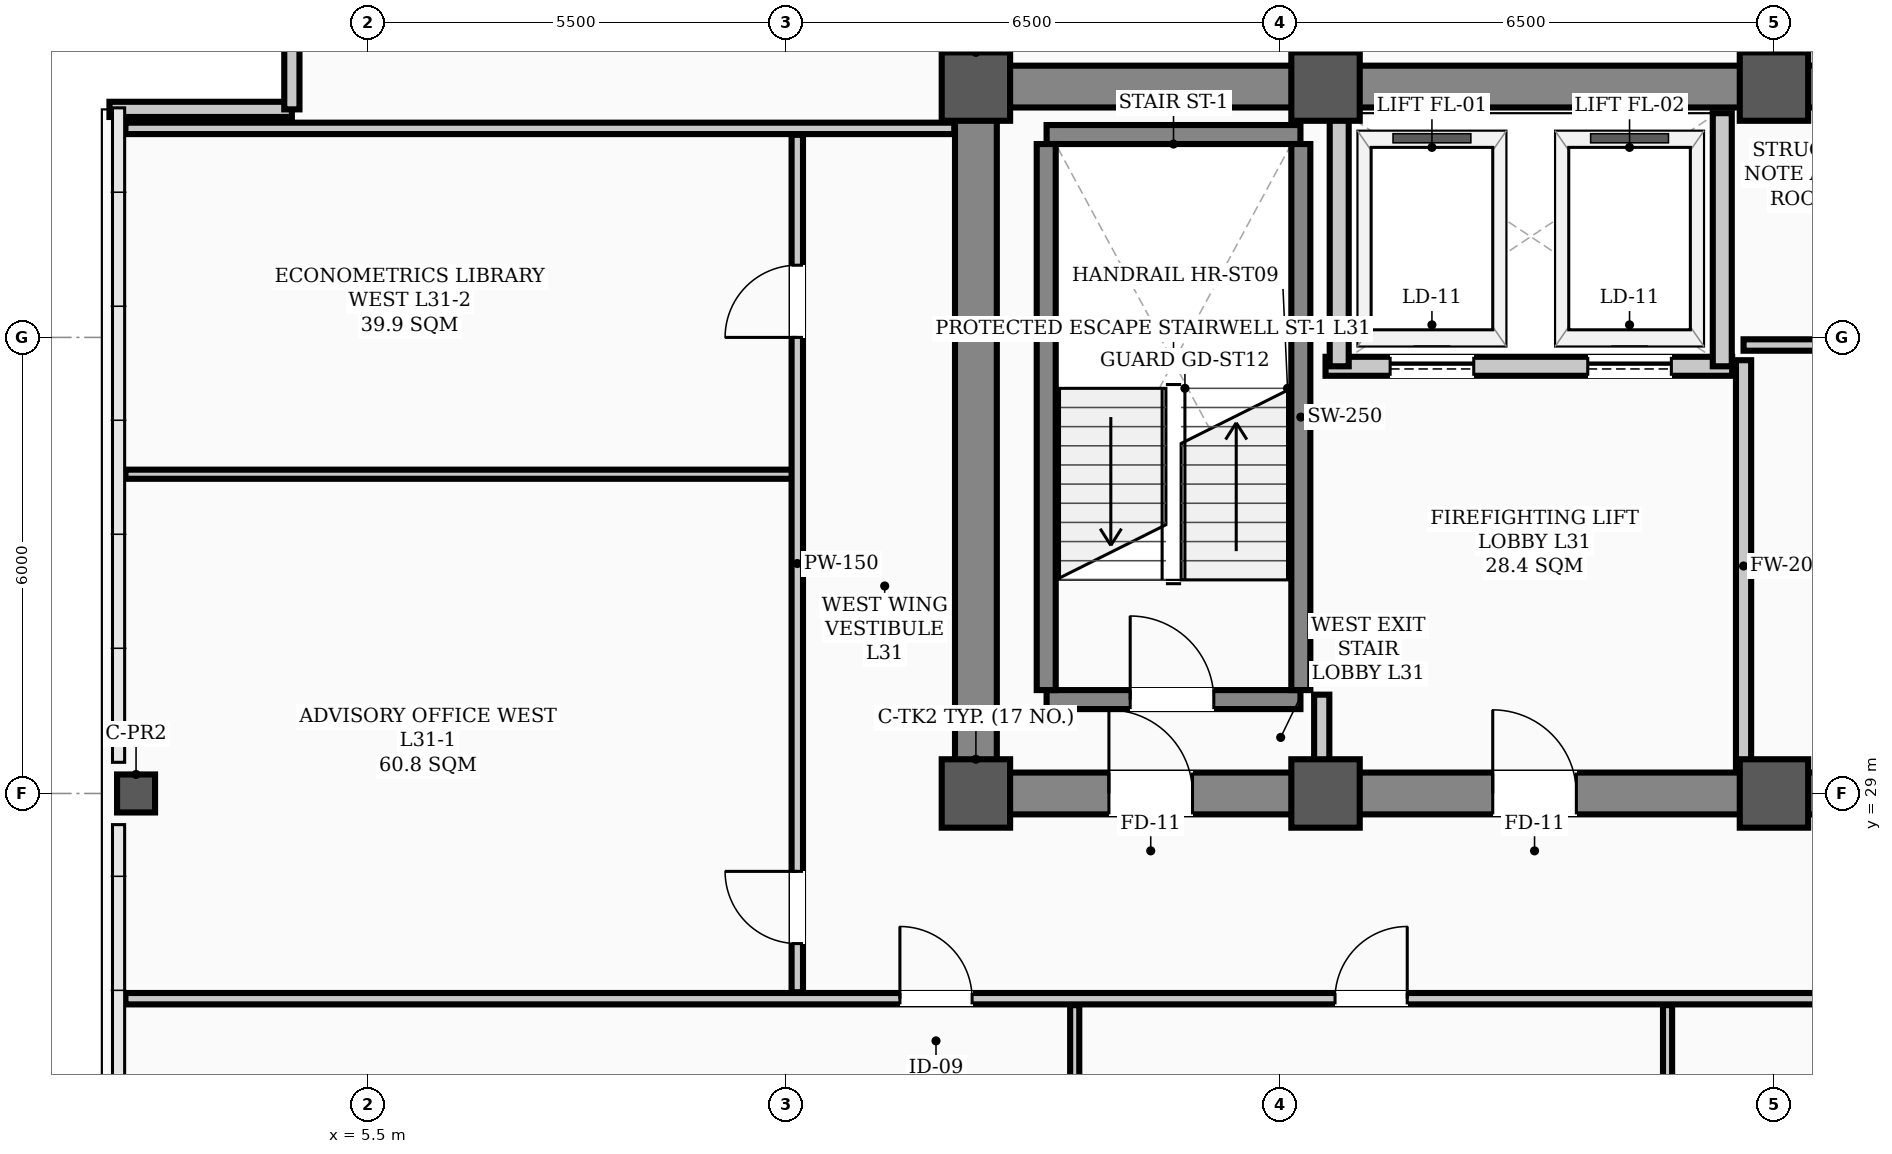
"""IFC4 building model, lengths in metres.
Left out: names, types, materials, properties, quantities, classifications, styles, units other than length and angle.
Written with IfcOpenShell. Run it as: python <this file> out.ifc"""

import sys

from ifc_helpers import new_model, si_unit, direction, frame, frame_2d, origin, origin_2d, place, context, subcontext, project, spatial, rectangle, hollow_rectangle, extrude, element, fill, save


model = new_model("IFC4")
c1 = context("Model", 3, precision=1e-05, world=origin(), true_north=direction((0.0, 1.0)))
c2 = subcontext(c1, "Body", "Model", "MODEL_VIEW")
j1 = project(units=[si_unit("LENGTHUNIT", "METRE"), si_unit("PLANEANGLEUNIT", "RADIAN")], contexts=[c1])
p1 = place(None, origin())
s1 = spatial("IfcSite", under=j1, at=p1, CompositionType="ELEMENT")
p2 = place(p1, origin())
s2 = spatial("IfcBuilding", under=s1, at=p2, CompositionType="ELEMENT")
p3 = place(p2, frame((0.0, 0.0, 126.6)))
s3 = spatial("IfcBuildingStorey", under=s2, at=p3, CompositionType="ELEMENT", Elevation=126.6)
for number, where, z_axis, x_axis in (
    (1, (13.5, 29.0, 0.0), (0.0, 0.0, 1.0), (1.0, 0.0, 0.0)),
    (2, (13.5, 38.3, 0.0), (0.0, 0.0, 1.0), (1.0, 0.0, 0.0)),
    (3, (18.1, 29.0, 0.0), (0.0, 0.0, 1.0), (1.0, 0.0, 0.0)),
    (4, (18.1, 38.3, 0.0), (0.0, 0.0, 1.0), (1.0, 0.0, 0.0)),
    (5, (24.0, 29.0, 0.0), (0.0, 0.0, 1.0), (1.0, 0.0, 0.0)),
    (6, (24.0, 38.3, 0.0), (0.0, 0.0, 1.0), (1.0, 0.0, 0.0)),
):
    element("IfcColumn", number, at=place(p3, frame(where, z_axis=z_axis, x_axis=x_axis)), inside=s3, PredefinedType="COLUMN", context=c2, shape_type="SweptSolid", body=[
        extrude(hollow_rectangle(XDim=0.9, YDim=0.9, WallThickness=0.035, InnerFilletRadius=0.017, OuterFilletRadius=0.052, at=origin_2d()), origin(), (0.0, 0.0, 1.0), 3.9),
    ])
p4 = place(p3, frame((2.45, 29.0, 0.0), z_axis=(0.0, 0.0, 1.0), x_axis=(1.0, 0.0, 0.0)))
e7 = element("IfcColumn", 7, at=p4, inside=s3, PredefinedType="COLUMN", context=c2, shape_type="SweptSolid", body=[
    extrude(hollow_rectangle(XDim=0.5, YDim=0.5, WallThickness=0.024, InnerFilletRadius=0.012, OuterFilletRadius=0.036, at=origin_2d()), origin(), (0.0, 0.0, 1.0), 3.9),
])
for number, where, z_axis, x_axis in (
    (8, (2.1, 38.0, 0.0), (0.0, 0.0, 1.0), (1.0, 0.0, 0.0)),
    (9, (4.5, 38.0, 0.0), (0.0, 0.0, 1.0), (0.0, 1.0, 0.0)),
):
    element("IfcWall", number, at=place(p3, frame(where, z_axis=z_axis, x_axis=x_axis)), inside=s3, PredefinedType="PARAPET", context=c2, shape_type="SweptSolid", body=[
        extrude(rectangle(XDim=2.4, YDim=0.2, at=frame_2d((1.2, 0.0))), origin(), (0.0, 0.0, 1.0), 1.2),
    ])
p5 = place(p3, frame((13.5, 29.0, 0.0), z_axis=(0.0, 0.0, 1.0), x_axis=(1.0, 0.0, 0.0)))
e10 = element("IfcWall", 10, at=p5, inside=s3, PredefinedType="SHEAR", context=c2, shape_type="SweptSolid", body=[
    extrude(rectangle(XDim=30.5, YDim=0.55, at=frame_2d((15.25, 0.0))), origin(), (0.0, 0.0, 1.0), 3.72),
])
p6 = place(p5, frame((1.75, 0.0, 0.0)))
e11 = element("IfcOpeningElement", 11, at=p6, cuts=e10, PredefinedType="OPENING", context=c2, shape_type="SweptSolid", body=[
    extrude(rectangle(XDim=1.1, YDim=2.08, at=frame_2d((0.55, 1.04))), frame((0.0, 0.285, 0.0), z_axis=(0.0, -1.0, 0.0), x_axis=(1.0, 0.0, 0.0)), (0.0, 0.0, 1.0), 0.57),
])
p7 = place(p5, frame((26.7, 0.0, 0.0)))
e12 = element("IfcOpeningElement", 12, at=p7, cuts=e10, PredefinedType="OPENING", context=c2, shape_type="SweptSolid", body=[
    extrude(rectangle(XDim=1.1, YDim=2.08, at=frame_2d((0.55, 1.04))), frame((0.0, 0.285, 0.0), z_axis=(0.0, -1.0, 0.0), x_axis=(1.0, 0.0, 0.0)), (0.0, 0.0, 1.0), 0.57),
])
p8 = place(p5, frame((6.8, 0.0, 0.0)))
e13 = element("IfcOpeningElement", 13, at=p8, cuts=e10, PredefinedType="OPENING", context=c2, shape_type="SweptSolid", body=[
    extrude(rectangle(XDim=1.1, YDim=2.08, at=frame_2d((0.55, 1.04))), frame((0.0, 0.285, 0.0), z_axis=(0.0, -1.0, 0.0), x_axis=(1.0, 0.0, 0.0)), (0.0, 0.0, 1.0), 0.57),
])
p9 = place(p5, frame((13.2, 0.0, 0.0)))
e14 = element("IfcOpeningElement", 14, at=p9, cuts=e10, PredefinedType="OPENING", context=c2, shape_type="SweptSolid", body=[
    extrude(rectangle(XDim=1.6, YDim=2.08, at=frame_2d((0.8, 1.04))), frame((0.0, 0.285, 0.0), z_axis=(0.0, -1.0, 0.0), x_axis=(1.0, 0.0, 0.0)), (0.0, 0.0, 1.0), 0.57),
])
p10 = place(p5, frame((19.6, 0.0, 0.0)))
e15 = element("IfcOpeningElement", 15, at=p10, cuts=e10, PredefinedType="OPENING", context=c2, shape_type="SweptSolid", body=[
    extrude(rectangle(XDim=0.9, YDim=2.08, at=frame_2d((0.45, 1.04))), frame((0.0, 0.285, 0.0), z_axis=(0.0, -1.0, 0.0), x_axis=(1.0, 0.0, 0.0)), (0.0, 0.0, 1.0), 0.57),
])
p11 = place(p5, frame((21.6, 0.0, 0.0)))
e16 = element("IfcOpeningElement", 16, at=p11, cuts=e10, PredefinedType="OPENING", context=c2, shape_type="SweptSolid", body=[
    extrude(rectangle(XDim=0.9, YDim=2.08, at=frame_2d((0.45, 1.04))), frame((0.0, 0.285, 0.0), z_axis=(0.0, -1.0, 0.0), x_axis=(1.0, 0.0, 0.0)), (0.0, 0.0, 1.0), 0.57),
])
p12 = place(p3, frame((13.5, 38.3, 0.0), z_axis=(0.0, 0.0, 1.0), x_axis=(1.0, 0.0, 0.0)))
e17 = element("IfcWall", 17, at=p12, inside=s3, PredefinedType="SHEAR", context=c2, shape_type="SweptSolid", body=[
    extrude(rectangle(XDim=30.5, YDim=0.55, at=frame_2d((15.25, 0.0))), origin(), (0.0, 0.0, 1.0), 3.72),
])
p13 = place(p3, frame((13.5, 29.35, 0.0), z_axis=(0.0, 0.0, 1.0), x_axis=(0.0, 1.0, 0.0)))
e18 = element("IfcWall", 18, at=p13, inside=s3, PredefinedType="SHEAR", context=c2, shape_type="SweptSolid", body=[
    extrude(rectangle(XDim=8.6, YDim=0.55, at=frame_2d((4.3, 0.0))), origin(), (0.0, 0.0, 1.0), 3.72),
])
p14 = place(p3, frame((14.43, 30.235, 0.0), z_axis=(0.0, 0.0, 1.0), x_axis=(1.0, 0.0, 0.0)))
e19 = element("IfcWall", 19, at=p14, inside=s3, PredefinedType="STANDARD", context=c2, shape_type="SweptSolid", body=[
    extrude(rectangle(XDim=3.34, YDim=0.25, at=frame_2d((1.67, 0.0))), origin(), (0.0, 0.0, 1.0), 3.72),
])
p15 = place(p14, frame((1.1, 0.0, 0.0)))
e20 = element("IfcOpeningElement", 20, at=p15, cuts=e19, PredefinedType="OPENING", context=c2, shape_type="SweptSolid", body=[
    extrude(rectangle(XDim=1.1, YDim=2.08, at=frame_2d((0.55, 1.04))), frame((0.0, 0.135, 0.0), z_axis=(0.0, -1.0, 0.0), x_axis=(1.0, 0.0, 0.0)), (0.0, 0.0, 1.0), 0.27),
])
p16 = place(p3, frame((14.43, 37.669, 0.0), z_axis=(0.0, 0.0, 1.0), x_axis=(1.0, 0.0, 0.0)))
e21 = element("IfcWall", 21, at=p16, inside=s3, PredefinedType="STANDARD", context=c2, shape_type="SweptSolid", body=[
    extrude(rectangle(XDim=3.34, YDim=0.25, at=frame_2d((1.67, 0.0))), origin(), (0.0, 0.0, 1.0), 3.72),
])
for number, where, z_axis, x_axis in (
    (22, (14.425, 30.36, 0.0), (0.0, 0.0, 1.0), (0.0, 1.0, 0.0)),
    (23, (17.775, 30.36, 0.0), (0.0, 0.0, 1.0), (0.0, 1.0, 0.0)),
):
    element("IfcWall", number, at=place(p3, frame(where, z_axis=z_axis, x_axis=x_axis)), inside=s3, PredefinedType="STANDARD", context=c2, shape_type="SweptSolid", body=[
        extrude(rectangle(XDim=7.184, YDim=0.25, at=frame_2d((3.592, 0.0))), origin(), (0.0, 0.0, 1.0), 3.72),
    ])
p17 = place(p3, frame((18.1, 34.62, 0.0), z_axis=(0.0, 0.0, 1.0), x_axis=(1.0, 0.0, 0.0)))
e24 = element("IfcWall", 24, at=p17, inside=s3, PredefinedType="STANDARD", context=c2, shape_type="SweptSolid", body=[
    extrude(rectangle(XDim=5.35, YDim=0.25, at=frame_2d((2.675, 0.0))), origin(), (0.0, 0.0, 1.0), 3.72),
])
p18 = place(p17, frame((0.85, 0.0, 0.0)))
e25 = element("IfcOpeningElement", 25, at=p18, cuts=e24, PredefinedType="OPENING", context=c2, shape_type="SweptSolid", body=[
    extrude(rectangle(XDim=1.1, YDim=2.08, at=frame_2d((0.55, 1.04))), frame((0.0, 0.135, 0.0), z_axis=(0.0, -1.0, 0.0), x_axis=(1.0, 0.0, 0.0)), (0.0, 0.0, 1.0), 0.27),
])
p19 = place(p17, frame((3.45, 0.0, 0.0)))
e26 = element("IfcOpeningElement", 26, at=p19, cuts=e24, PredefinedType="OPENING", context=c2, shape_type="SweptSolid", body=[
    extrude(rectangle(XDim=1.1, YDim=2.08, at=frame_2d((0.55, 1.04))), frame((0.0, 0.135, 0.0), z_axis=(0.0, -1.0, 0.0), x_axis=(1.0, 0.0, 0.0)), (0.0, 0.0, 1.0), 0.27),
])
for number, where, z_axis, x_axis in (
    (27, (18.28, 34.62, 0.0), (0.0, 0.0, 1.0), (0.0, 1.0, 0.0)),
    (28, (23.32, 34.62, 0.0), (0.0, 0.0, 1.0), (0.0, 1.0, 0.0)),
):
    element("IfcWall", number, at=place(p3, frame(where, z_axis=z_axis, x_axis=x_axis)), inside=s3, PredefinedType="STANDARD", context=c2, shape_type="SweptSolid", body=[
        extrude(rectangle(XDim=3.33, YDim=0.25, at=frame_2d((1.665, 0.0))), origin(), (0.0, 0.0, 1.0), 3.72),
    ])
p20 = place(p3, frame((23.6, 34.9, 0.0), z_axis=(0.0, 0.0, 1.0), x_axis=(1.0, 0.0, 0.0)))
e29 = element("IfcWall", 29, at=p20, inside=s3, PredefinedType="PARTITIONING", context=c2, shape_type="SweptSolid", body=[
    extrude(rectangle(XDim=4.58, YDim=0.15, at=frame_2d((2.29, 0.0))), origin(), (0.0, 0.0, 1.0), 3.72),
])
p21 = place(p20, frame((1.875, 0.0, 0.0)))
e30 = element("IfcOpeningElement", 30, at=p21, cuts=e29, PredefinedType="OPENING", context=c2, shape_type="SweptSolid", body=[
    extrude(rectangle(XDim=0.95, YDim=2.08, at=frame_2d((0.475, 1.04))), frame((0.0, 0.085, 0.0), z_axis=(0.0, -1.0, 0.0), x_axis=(1.0, 0.0, 0.0)), (0.0, 0.0, 1.0), 0.17),
])
p22 = place(p3, frame((2.31, 26.3, 0.0), z_axis=(0.0, 0.0, 1.0), x_axis=(1.0, 0.0, 0.0)))
e31 = element("IfcWall", 31, at=p22, inside=s3, PredefinedType="PARTITIONING", context=c2, shape_type="SweptSolid", body=[
    extrude(rectangle(XDim=46.38, YDim=0.15, at=frame_2d((23.19, 0.0))), origin(), (0.0, 0.0, 1.0), 3.1),
])
p23 = place(p22, frame((10.19, 0.0, 0.0)))
e32 = element("IfcOpeningElement", 32, at=p23, cuts=e31, PredefinedType="OPENING", context=c2, shape_type="SweptSolid", body=[
    extrude(rectangle(XDim=0.95, YDim=2.08, at=frame_2d((0.475, 1.04))), frame((0.0, 0.085, 0.0), z_axis=(0.0, -1.0, 0.0), x_axis=(1.0, 0.0, 0.0)), (0.0, 0.0, 1.0), 0.17),
])
p24 = place(p22, frame((15.915, 0.0, 0.0)))
e33 = element("IfcOpeningElement", 33, at=p24, cuts=e31, PredefinedType="OPENING", context=c2, shape_type="SweptSolid", body=[
    extrude(rectangle(XDim=0.95, YDim=2.08, at=frame_2d((0.475, 1.04))), frame((0.0, 0.085, 0.0), z_axis=(0.0, -1.0, 0.0), x_axis=(1.0, 0.0, 0.0)), (0.0, 0.0, 1.0), 0.17),
])
p25 = place(p22, frame((24.115, 0.0, 0.0)))
e34 = element("IfcOpeningElement", 34, at=p25, cuts=e31, PredefinedType="OPENING", context=c2, shape_type="SweptSolid", body=[
    extrude(rectangle(XDim=0.95, YDim=2.08, at=frame_2d((0.475, 1.04))), frame((0.0, 0.085, 0.0), z_axis=(0.0, -1.0, 0.0), x_axis=(1.0, 0.0, 0.0)), (0.0, 0.0, 1.0), 0.17),
])
p26 = place(p22, frame((32.515, 0.0, 0.0)))
e35 = element("IfcOpeningElement", 35, at=p26, cuts=e31, PredefinedType="OPENING", context=c2, shape_type="SweptSolid", body=[
    extrude(rectangle(XDim=0.95, YDim=2.08, at=frame_2d((0.475, 1.04))), frame((0.0, 0.085, 0.0), z_axis=(0.0, -1.0, 0.0), x_axis=(1.0, 0.0, 0.0)), (0.0, 0.0, 1.0), 0.17),
])
p27 = place(p22, frame((37.665, 0.0, 0.0)))
e36 = element("IfcOpeningElement", 36, at=p27, cuts=e31, PredefinedType="OPENING", context=c2, shape_type="SweptSolid", body=[
    extrude(rectangle(XDim=0.95, YDim=2.08, at=frame_2d((0.475, 1.04))), frame((0.0, 0.085, 0.0), z_axis=(0.0, -1.0, 0.0), x_axis=(1.0, 0.0, 0.0)), (0.0, 0.0, 1.0), 0.17),
])
p28 = place(p3, frame((2.31, 37.75, 0.0), z_axis=(0.0, 0.0, 1.0), x_axis=(1.0, 0.0, 0.0)))
e37 = element("IfcWall", 37, at=p28, inside=s3, PredefinedType="PARTITIONING", context=c2, shape_type="SweptSolid", body=[
    extrude(rectangle(XDim=10.905, YDim=0.15, at=frame_2d((5.453, 0.0))), origin(), (0.0, 0.0, 1.0), 3.1),
])
p29 = place(p3, frame((2.31, 33.2, 0.0), z_axis=(0.0, 0.0, 1.0), x_axis=(1.0, 0.0, 0.0)))
e38 = element("IfcWall", 38, at=p29, inside=s3, PredefinedType="PARTITIONING", context=c2, shape_type="SweptSolid", body=[
    extrude(rectangle(XDim=8.84, YDim=0.12, at=frame_2d((4.42, 0.0))), origin(), (0.0, 0.0, 1.0), 3.72),
])
p30 = place(p3, frame((18.05, 29.285, 0.0), z_axis=(0.0, 0.0, 1.0), x_axis=(0.0, 1.0, 0.0)))
e39 = element("IfcWall", 39, at=p30, inside=s3, PredefinedType="STANDARD", context=c2, shape_type="SweptSolid", body=[
    extrude(rectangle(XDim=1.015, YDim=0.2, at=frame_2d((0.508, 0.0))), origin(), (0.0, 0.0, 1.0), 3.3),
])
p31 = place(p3, frame((23.6, 29.285, 0.0), z_axis=(0.0, 0.0, 1.0), x_axis=(0.0, 1.0, 0.0)))
e40 = element("IfcWall", 40, at=p31, inside=s3, PredefinedType="STANDARD", context=c2, shape_type="SweptSolid", body=[
    extrude(rectangle(XDim=5.415, YDim=0.2, at=frame_2d((2.708, 0.0))), origin(), (0.0, 0.0, 1.0), 3.1),
])
p32 = place(p3, frame((11.15, 26.385, 0.0), z_axis=(0.0, 0.0, 1.0), x_axis=(0.0, 1.0, 0.0)))
e41 = element("IfcWall", 41, at=p32, inside=s3, PredefinedType="PARTITIONING", context=c2, shape_type="SweptSolid", body=[
    extrude(rectangle(XDim=11.28, YDim=0.15, at=frame_2d((5.64, 0.0))), origin(), (0.0, 0.0, 1.0), 3.0),
])
p33 = place(p32, frame((0.64, 0.0, 0.0)))
e42 = element("IfcOpeningElement", 42, at=p33, cuts=e41, PredefinedType="OPENING", context=c2, shape_type="SweptSolid", body=[
    extrude(rectangle(XDim=0.95, YDim=2.08, at=frame_2d((0.475, 1.04))), frame((0.0, 0.085, 0.0), z_axis=(0.0, -1.0, 0.0), x_axis=(1.0, 0.0, 0.0)), (0.0, 0.0, 1.0), 0.17),
])
p34 = place(p32, frame((8.615, 0.0, 0.0)))
e43 = element("IfcOpeningElement", 43, at=p34, cuts=e41, PredefinedType="OPENING", context=c2, shape_type="SweptSolid", body=[
    extrude(rectangle(XDim=0.95, YDim=2.08, at=frame_2d((0.475, 1.04))), frame((0.0, 0.085, 0.0), z_axis=(0.0, -1.0, 0.0), x_axis=(1.0, 0.0, 0.0)), (0.0, 0.0, 1.0), 0.17),
])
p35 = place(p3, frame((14.8, 10.81, 0.0), z_axis=(0.0, 0.0, 1.0), x_axis=(0.0, 1.0, 0.0)))
e44 = element("IfcWall", 44, at=p35, inside=s3, PredefinedType="PARTITIONING", context=c2, shape_type="SweptSolid", body=[
    extrude(rectangle(XDim=15.405, YDim=0.12, at=frame_2d((7.703, 0.0))), origin(), (0.0, 0.0, 1.0), 3.0),
])
p36 = place(p3, frame((22.6, 12.57, 0.0), z_axis=(0.0, 0.0, 1.0), x_axis=(0.0, 1.0, 0.0)))
e45 = element("IfcWall", 45, at=p36, inside=s3, PredefinedType="PARTITIONING", context=c2, shape_type="SweptSolid", body=[
    extrude(rectangle(XDim=13.645, YDim=0.12, at=frame_2d((6.823, 0.0))), origin(), (0.0, 0.0, 1.0), 3.0),
])
p37 = place(p15, origin())
e46 = element("IfcDoor", 46, at=p37, inside=s3, OperationType="SINGLE_SWING_LEFT", PredefinedType="DOOR", context=c2, shape_type="SweptSolid", body=[
    extrude(rectangle(XDim=1.1, YDim=2.08, at=frame_2d((0.55, 1.04))), frame((0.0, 0.025, 0.0), z_axis=(0.0, -1.0, 0.0), x_axis=(1.0, 0.0, 0.0)), (0.0, 0.0, 1.0), 0.05),
])
fill(e20, e46)
p38 = place(p6, origin())
e47 = element("IfcDoor", 47, at=p38, inside=s3, OperationType="SINGLE_SWING_LEFT", PredefinedType="DOOR", context=c2, shape_type="SweptSolid", body=[
    extrude(rectangle(XDim=1.1, YDim=2.08, at=frame_2d((0.55, 1.04))), frame((0.0, 0.025, 0.0), z_axis=(0.0, -1.0, 0.0), x_axis=(1.0, 0.0, 0.0)), (0.0, 0.0, 1.0), 0.05),
])
fill(e11, e47)
p39 = place(p8, origin())
e48 = element("IfcDoor", 48, at=p39, inside=s3, OperationType="SINGLE_SWING_LEFT", PredefinedType="DOOR", context=c2, shape_type="SweptSolid", body=[
    extrude(rectangle(XDim=1.1, YDim=2.08, at=frame_2d((0.55, 1.04))), frame((0.0, 0.025, 0.0), z_axis=(0.0, -1.0, 0.0), x_axis=(1.0, 0.0, 0.0)), (0.0, 0.0, 1.0), 0.05),
])
fill(e13, e48)
p40 = place(p23, origin())
e49 = element("IfcDoor", 49, at=p40, inside=s3, OperationType="SINGLE_SWING_LEFT", PredefinedType="DOOR", context=c2, shape_type="SweptSolid", body=[
    extrude(rectangle(XDim=0.95, YDim=2.08, at=frame_2d((0.475, 1.04))), frame((0.0, 0.025, 0.0), z_axis=(0.0, -1.0, 0.0), x_axis=(1.0, 0.0, 0.0)), (0.0, 0.0, 1.0), 0.05),
])
fill(e32, e49)
p41 = place(p24, origin())
e50 = element("IfcDoor", 50, at=p41, inside=s3, OperationType="SINGLE_SWING_RIGHT", PredefinedType="DOOR", context=c2, shape_type="SweptSolid", body=[
    extrude(rectangle(XDim=0.95, YDim=2.08, at=frame_2d((0.475, 1.04))), frame((0.0, 0.025, 0.0), z_axis=(0.0, -1.0, 0.0), x_axis=(1.0, 0.0, 0.0)), (0.0, 0.0, 1.0), 0.05),
])
fill(e33, e50)
p42 = place(p33, origin())
e51 = element("IfcDoor", 51, at=p42, inside=s3, OperationType="SINGLE_SWING_RIGHT", PredefinedType="DOOR", context=c2, shape_type="SweptSolid", body=[
    extrude(rectangle(XDim=0.95, YDim=2.08, at=frame_2d((0.475, 1.04))), frame((0.0, 0.025, 0.0), z_axis=(0.0, -1.0, 0.0), x_axis=(1.0, 0.0, 0.0)), (0.0, 0.0, 1.0), 0.05),
])
fill(e42, e51)
p43 = place(p34, origin())
e52 = element("IfcDoor", 52, at=p43, inside=s3, OperationType="SINGLE_SWING_LEFT", PredefinedType="DOOR", context=c2, shape_type="SweptSolid", body=[
    extrude(rectangle(XDim=0.95, YDim=2.08, at=frame_2d((0.475, 1.04))), frame((0.0, 0.025, 0.0), z_axis=(0.0, -1.0, 0.0), x_axis=(1.0, 0.0, 0.0)), (0.0, 0.0, 1.0), 0.05),
])
fill(e43, e52)
p44 = place(p18, origin())
e53 = element("IfcDoor", 53, at=p44, inside=s3, OperationType="SLIDING_TO_LEFT", PredefinedType="DOOR", context=c2, shape_type="SweptSolid", body=[
    extrude(rectangle(XDim=1.1, YDim=2.08, at=frame_2d((0.55, 1.04))), frame((0.0, 0.025, 0.0), z_axis=(0.0, -1.0, 0.0), x_axis=(1.0, 0.0, 0.0)), (0.0, 0.0, 1.0), 0.05),
])
fill(e25, e53)
p45 = place(p19, origin())
e54 = element("IfcDoor", 54, at=p45, inside=s3, OperationType="SLIDING_TO_LEFT", PredefinedType="DOOR", context=c2, shape_type="SweptSolid", body=[
    extrude(rectangle(XDim=1.1, YDim=2.08, at=frame_2d((0.55, 1.04))), frame((0.0, 0.025, 0.0), z_axis=(0.0, -1.0, 0.0), x_axis=(1.0, 0.0, 0.0)), (0.0, 0.0, 1.0), 0.05),
])
fill(e26, e54)
save(model, sys.argv[1])
